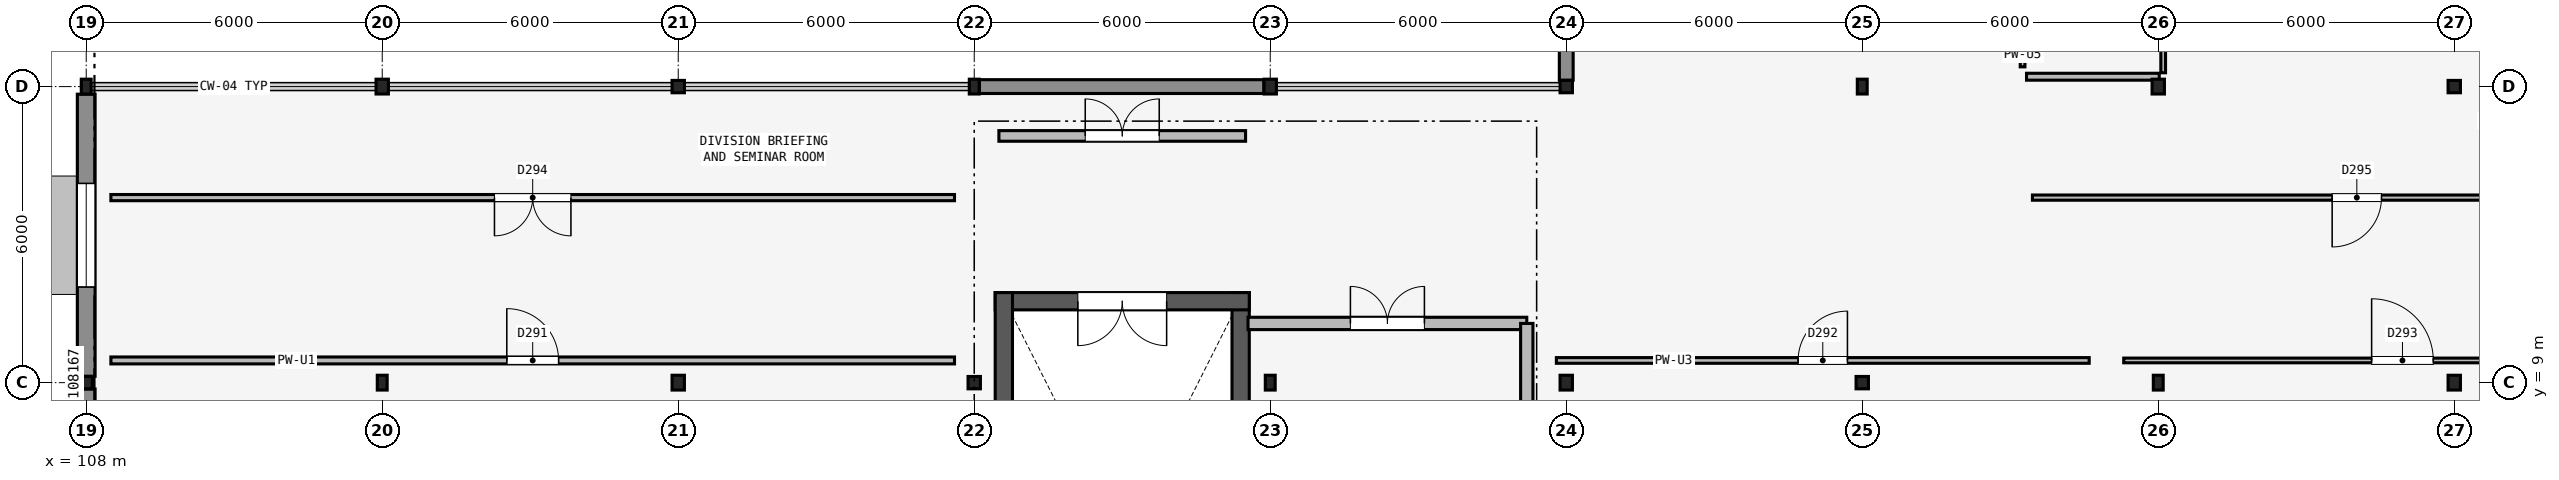
"""IFC4 building model, lengths in metres.
Left out: names, types, materials, properties, quantities, classifications, styles, units other than length and angle.
Written with IfcOpenShell. Run it as: python <this file> out.ifc"""

import sys

from ifc_helpers import new_model, si_unit, direction, frame, frame_2d, origin, origin_2d, place, context, subcontext, project, spatial, rectangle, hollow_rectangle, i_section, extrude, element, fill, save


model = new_model("IFC4")
c1 = context("Model", 3, precision=1e-05, world=origin(), true_north=direction((0.0, 1.0)))
c2 = subcontext(c1, "Body", "Model", "MODEL_VIEW")
j1 = project(units=[si_unit("LENGTHUNIT", "METRE"), si_unit("PLANEANGLEUNIT", "RADIAN")], contexts=[c1])
p1 = place(None, origin())
s1 = spatial("IfcSite", under=j1, at=p1, CompositionType="ELEMENT")
p2 = place(p1, origin())
s2 = spatial("IfcBuilding", under=s1, at=p2, CompositionType="ELEMENT")
p3 = place(p2, frame((0.0, 0.0, 26.1)))
s3 = spatial("IfcBuildingStorey", under=s2, at=p3, CompositionType="ELEMENT", Elevation=26.1)
p4 = place(p3, frame((108.0, 9.0, 0.0), z_axis=(0.0, 0.0, 1.0), x_axis=(1.0, 0.0, 0.0)))
e1 = element("IfcColumn", 1, at=p4, inside=s3, PredefinedType="COLUMN", context=c2, shape_type="SweptSolid", body=[
    extrude(hollow_rectangle(XDim=0.25, YDim=0.25, WallThickness=0.012, InnerFilletRadius=0.012, OuterFilletRadius=0.024, at=origin_2d()), origin(), (0.0, 0.0, 1.0), 3.9),
])
for number, where, z_axis, x_axis in (
    (2, (108.0, 15.0, 0.0), (0.0, 0.0, 1.0), (1.0, 0.0, 0.0)),
    (3, (114.0, 9.0, 0.0), (0.0, 0.0, 1.0), (1.0, 0.0, 0.0)),
):
    element("IfcColumn", number, at=place(p3, frame(where, z_axis=z_axis, x_axis=x_axis)), inside=s3, PredefinedType="COLUMN", context=c2, shape_type="SweptSolid", body=[
        extrude(hollow_rectangle(XDim=0.2, YDim=0.3, WallThickness=0.012, InnerFilletRadius=0.012, OuterFilletRadius=0.024, at=origin_2d()), origin(), (0.0, 0.0, 1.0), 3.9),
    ])
for number, where, z_axis, x_axis in (
    (4, (114.0, 15.0, 0.0), (0.0, 0.0, 1.0), (1.0, 0.0, 0.0)),
    (5, (120.0, 9.0, 0.0), (0.0, 0.0, 1.0), (1.0, 0.0, 0.0)),
):
    element("IfcColumn", number, at=place(p3, frame(where, z_axis=z_axis, x_axis=x_axis)), inside=s3, PredefinedType="COLUMN", context=c2, shape_type="SweptSolid", body=[
        extrude(i_section(OverallWidth=0.25, OverallDepth=0.3, WebThickness=0.01, FlangeThickness=0.01, FilletRadius=0.012, at=origin_2d()), origin(), (0.0, 0.0, 1.0), 3.9),
    ])
for number, where, z_axis, x_axis in (
    (6, (120.0, 15.0, 0.0), (0.0, 0.0, 1.0), (1.0, 0.0, 0.0)),
    (7, (126.0, 9.0, 0.0), (0.0, 0.0, 1.0), (1.0, 0.0, 0.0)),
):
    element("IfcColumn", number, at=place(p3, frame(where, z_axis=z_axis, x_axis=x_axis)), inside=s3, PredefinedType="COLUMN", context=c2, shape_type="SweptSolid", body=[
        extrude(hollow_rectangle(XDim=0.25, YDim=0.25, WallThickness=0.012, InnerFilletRadius=0.012, OuterFilletRadius=0.024, at=origin_2d()), origin(), (0.0, 0.0, 1.0), 3.9),
    ])
for number, where, z_axis, x_axis in (
    (8, (126.0, 15.0, 0.0), (0.0, 0.0, 1.0), (1.0, 0.0, 0.0)),
    (9, (132.0, 9.0, 0.0), (0.0, 0.0, 1.0), (1.0, 0.0, 0.0)),
):
    element("IfcColumn", number, at=place(p3, frame(where, z_axis=z_axis, x_axis=x_axis)), inside=s3, PredefinedType="COLUMN", context=c2, shape_type="SweptSolid", body=[
        extrude(hollow_rectangle(XDim=0.2, YDim=0.3, WallThickness=0.012, InnerFilletRadius=0.012, OuterFilletRadius=0.024, at=origin_2d()), origin(), (0.0, 0.0, 1.0), 3.9),
    ])
for number, where, z_axis, x_axis in (
    (10, (132.0, 15.0, 0.0), (0.0, 0.0, 1.0), (1.0, 0.0, 0.0)),
    (11, (138.0, 9.0, 0.0), (0.0, 0.0, 1.0), (1.0, 0.0, 0.0)),
):
    element("IfcColumn", number, at=place(p3, frame(where, z_axis=z_axis, x_axis=x_axis)), inside=s3, PredefinedType="COLUMN", context=c2, shape_type="SweptSolid", body=[
        extrude(i_section(OverallWidth=0.25, OverallDepth=0.3, WebThickness=0.01, FlangeThickness=0.01, FilletRadius=0.012, at=origin_2d()), origin(), (0.0, 0.0, 1.0), 3.9),
    ])
for number, where, z_axis, x_axis in (
    (12, (138.0, 15.0, 0.0), (0.0, 0.0, 1.0), (1.0, 0.0, 0.0)),
    (13, (144.0, 9.0, 0.0), (0.0, 0.0, 1.0), (1.0, 0.0, 0.0)),
):
    element("IfcColumn", number, at=place(p3, frame(where, z_axis=z_axis, x_axis=x_axis)), inside=s3, PredefinedType="COLUMN", context=c2, shape_type="SweptSolid", body=[
        extrude(hollow_rectangle(XDim=0.25, YDim=0.25, WallThickness=0.012, InnerFilletRadius=0.012, OuterFilletRadius=0.024, at=origin_2d()), origin(), (0.0, 0.0, 1.0), 3.9),
    ])
for number, where, z_axis, x_axis in (
    (14, (144.0, 15.0, 0.0), (0.0, 0.0, 1.0), (1.0, 0.0, 0.0)),
    (15, (150.0, 9.0, 0.0), (0.0, 0.0, 1.0), (1.0, 0.0, 0.0)),
):
    element("IfcColumn", number, at=place(p3, frame(where, z_axis=z_axis, x_axis=x_axis)), inside=s3, PredefinedType="COLUMN", context=c2, shape_type="SweptSolid", body=[
        extrude(hollow_rectangle(XDim=0.2, YDim=0.3, WallThickness=0.012, InnerFilletRadius=0.012, OuterFilletRadius=0.024, at=origin_2d()), origin(), (0.0, 0.0, 1.0), 3.9),
    ])
for number, where, z_axis, x_axis in (
    (16, (150.0, 15.0, 0.0), (0.0, 0.0, 1.0), (1.0, 0.0, 0.0)),
    (17, (156.0, 9.0, 0.0), (0.0, 0.0, 1.0), (1.0, 0.0, 0.0)),
):
    element("IfcColumn", number, at=place(p3, frame(where, z_axis=z_axis, x_axis=x_axis)), inside=s3, PredefinedType="COLUMN", context=c2, shape_type="SweptSolid", body=[
        extrude(i_section(OverallWidth=0.25, OverallDepth=0.3, WebThickness=0.01, FlangeThickness=0.01, FilletRadius=0.012, at=origin_2d()), origin(), (0.0, 0.0, 1.0), 3.9),
    ])
p5 = place(p3, frame((156.0, 15.0, 0.0), z_axis=(0.0, 0.0, 1.0), x_axis=(1.0, 0.0, 0.0)))
e18 = element("IfcColumn", 18, at=p5, inside=s3, PredefinedType="COLUMN", context=c2, shape_type="SweptSolid", body=[
    extrude(hollow_rectangle(XDim=0.25, YDim=0.25, WallThickness=0.012, InnerFilletRadius=0.012, OuterFilletRadius=0.024, at=origin_2d()), origin(), (0.0, 0.0, 1.0), 3.9),
])
p6 = place(p3, frame((126.104, 15.0, 0.0), z_axis=(0.0, 0.0, 1.0), x_axis=(1.0, 0.0, 0.0)))
e19 = element("IfcWall", 19, at=p6, inside=s3, PredefinedType="SOLIDWALL", context=c2, shape_type="SweptSolid", body=[
    extrude(rectangle(XDim=5.767, YDim=0.28, at=frame_2d((2.884, 0.0))), origin(), (0.0, 0.0, 1.0), 3.13),
])
p7 = place(p3, frame((138.0, 15.129, 0.0), z_axis=(0.0, 0.0, 1.0), x_axis=(0.0, 1.0, 0.0)))
e20 = element("IfcWall", 20, at=p7, inside=s3, PredefinedType="SOLIDWALL", context=c2, shape_type="SweptSolid", body=[
    extrude(rectangle(XDim=5.717, YDim=0.28, at=frame_2d((2.858, 0.0))), origin(), (0.0, 0.0, 1.0), 3.08),
])
p8 = place(p3, frame((108.0, 6.8, 0.0), z_axis=(0.0, 0.0, 1.0), x_axis=(0.0, 1.0, 0.0)))
e21 = element("IfcWall", 21, at=p8, inside=s3, PredefinedType="SOLIDWALL", context=c2, shape_type="SweptSolid", body=[
    extrude(rectangle(XDim=2.071, YDim=0.36, at=frame_2d((1.036, 0.0))), origin(), (0.0, 0.0, 1.0), 3.18),
])
p9 = place(p3, frame((108.0, 9.129, 0.0), z_axis=(0.0, 0.0, 1.0), x_axis=(0.0, 1.0, 0.0)))
e22 = element("IfcWall", 22, at=p9, inside=s3, PredefinedType="SOLIDWALL", context=c2, shape_type="SweptSolid", body=[
    extrude(rectangle(XDim=5.717, YDim=0.36, at=frame_2d((2.858, 0.0))), origin(), (0.0, 0.0, 1.0), 3.18),
])
p10 = place(p9, frame((1.809, 0.0, 0.9)))
e23 = element("IfcOpeningElement", 23, at=p10, cuts=e22, PredefinedType="OPENING", context=c2, shape_type="SweptSolid", body=[
    extrude(rectangle(XDim=2.1, YDim=1.5, at=frame_2d((1.05, 0.75))), frame((0.0, 0.19, 0.0), z_axis=(0.0, -1.0, 0.0), x_axis=(1.0, 0.0, 0.0)), (0.0, 0.0, 1.0), 0.38),
])
p11 = place(p3, frame((131.4, 1.075, 0.0), z_axis=(0.0, 0.0, 1.0), x_axis=(0.0, 1.0, 0.0)))
e24 = element("IfcWall", 24, at=p11, inside=s3, PredefinedType="SHEAR", context=c2, shape_type="SweptSolid", body=[
    extrude(rectangle(XDim=9.75, YDim=0.35, at=frame_2d((4.875, 0.0))), origin(), (0.0, 0.0, 1.0), 3.76),
])
p12 = place(p3, frame((131.575, 10.65, 0.0), z_axis=(0.0, 0.0, 1.0), x_axis=(-1.0, 0.0, 0.0)))
e25 = element("IfcWall", 25, at=p12, inside=s3, PredefinedType="SHEAR", context=c2, shape_type="SweptSolid", body=[
    extrude(rectangle(XDim=5.15, YDim=0.35, at=frame_2d((2.575, 0.0))), origin(), (0.0, 0.0, 1.0), 3.76),
])
p13 = place(p12, frame((1.675, 0.0, 0.0)))
e26 = element("IfcOpeningElement", 26, at=p13, cuts=e25, PredefinedType="OPENING", context=c2, shape_type="SweptSolid", body=[
    extrude(rectangle(XDim=1.8, YDim=2.2, at=frame_2d((0.9, 1.1))), frame((0.0, 0.185, 0.0), z_axis=(0.0, -1.0, 0.0), x_axis=(1.0, 0.0, 0.0)), (0.0, 0.0, 1.0), 0.37),
])
p14 = place(p3, frame((126.6, 10.825, 0.0), z_axis=(0.0, 0.0, 1.0), x_axis=(0.0, -1.0, 0.0)))
e27 = element("IfcWall", 27, at=p14, inside=s3, PredefinedType="SHEAR", context=c2, shape_type="SweptSolid", body=[
    extrude(rectangle(XDim=9.75, YDim=0.35, at=frame_2d((4.875, 0.0))), origin(), (0.0, 0.0, 1.0), 3.76),
])
p15 = place(p3, frame((126.5, 14.0, 0.0), z_axis=(0.0, 0.0, 1.0), x_axis=(1.0, 0.0, 0.0)))
e28 = element("IfcWall", 28, at=p15, inside=s3, PredefinedType="PARTITIONING", context=c2, shape_type="SweptSolid", body=[
    extrude(rectangle(XDim=5.0, YDim=0.215, at=frame_2d((2.5, 0.0))), origin(), (0.0, 0.0, 1.0), 3.68),
])
p16 = place(p15, frame((1.75, 0.0, 0.0)))
e29 = element("IfcOpeningElement", 29, at=p16, cuts=e28, PredefinedType="OPENING", context=c2, shape_type="SweptSolid", body=[
    extrude(rectangle(XDim=1.5, YDim=2.15, at=frame_2d((0.75, 1.075))), frame((0.0, 0.117, 0.0), z_axis=(0.0, -1.0, 0.0), x_axis=(1.0, 0.0, 0.0)), (0.0, 0.0, 1.0), 0.235),
])
p17 = place(p3, frame((131.55, 10.2, 0.0), z_axis=(0.0, 0.0, 1.0), x_axis=(1.0, 0.0, 0.0)))
e30 = element("IfcWall", 30, at=p17, inside=s3, PredefinedType="PARTITIONING", context=c2, shape_type="SweptSolid", body=[
    extrude(rectangle(XDim=5.65, YDim=0.25, at=frame_2d((2.825, 0.0))), origin(), (0.0, 0.0, 1.0), 3.273),
])
p18 = place(p17, frame((2.075, 0.0, 0.0)))
e31 = element("IfcOpeningElement", 31, at=p18, cuts=e30, PredefinedType="OPENING", context=c2, shape_type="SweptSolid", body=[
    extrude(rectangle(XDim=1.5, YDim=2.15, at=frame_2d((0.75, 1.075))), frame((0.0, 0.135, 0.0), z_axis=(0.0, -1.0, 0.0), x_axis=(1.0, 0.0, 0.0)), (0.0, 0.0, 1.0), 0.27),
])
p19 = place(p3, frame((137.2, 5.8, 0.0), z_axis=(0.0, 0.0, 1.0), x_axis=(0.0, 1.0, 0.0)))
e32 = element("IfcWall", 32, at=p19, inside=s3, PredefinedType="PARTITIONING", context=c2, shape_type="SweptSolid", body=[
    extrude(rectangle(XDim=4.4, YDim=0.25, at=frame_2d((2.2, 0.0))), origin(), (0.0, 0.0, 1.0), 3.28),
])
p20 = place(p3, frame((147.25, 15.4, 0.0), z_axis=(0.0, 0.0, 1.0), x_axis=(0.0, 1.0, 0.0)))
e33 = element("IfcWall", 33, at=p20, inside=s3, PredefinedType="PARTITIONING", context=c2, shape_type="SweptSolid", body=[
    extrude(rectangle(XDim=2.5, YDim=0.095, at=frame_2d((1.25, 0.0))), origin(), (0.0, 0.0, 1.0), 3.68),
])
p21 = place(p20, frame((0.75, 0.0, 0.0)))
e34 = element("IfcOpeningElement", 34, at=p21, cuts=e33, PredefinedType="OPENING", context=c2, shape_type="SweptSolid", body=[
    extrude(rectangle(XDim=1.0, YDim=2.1, at=frame_2d((0.5, 1.05))), frame((0.0, 0.057, 0.0), z_axis=(0.0, -1.0, 0.0), x_axis=(1.0, 0.0, 0.0)), (0.0, 0.0, 1.0), 0.115),
])
p22 = place(p3, frame((108.5, 9.45, 0.0), z_axis=(0.0, 0.0, 1.0), x_axis=(1.0, 0.0, 0.0)))
e35 = element("IfcWall", 35, at=p22, inside=s3, PredefinedType="PARTITIONING", context=c2, shape_type="SweptSolid", body=[
    extrude(rectangle(XDim=17.1, YDim=0.14, at=frame_2d((8.55, 0.0))), origin(), (0.0, 0.0, 1.0), 3.273),
])
p23 = place(p22, frame((8.025, 0.0, 0.0)))
e36 = element("IfcOpeningElement", 36, at=p23, cuts=e35, PredefinedType="OPENING", context=c2, shape_type="SweptSolid", body=[
    extrude(rectangle(XDim=1.05, YDim=2.2, at=frame_2d((0.525, 1.1))), frame((0.0, 0.08, 0.0), z_axis=(0.0, -1.0, 0.0), x_axis=(1.0, 0.0, 0.0)), (0.0, 0.0, 1.0), 0.16),
])
p24 = place(p3, frame((137.8, 9.45, 0.0), z_axis=(0.0, 0.0, 1.0), x_axis=(1.0, 0.0, 0.0)))
e37 = element("IfcWall", 37, at=p24, inside=s3, PredefinedType="PARTITIONING", context=c2, shape_type="SweptSolid", body=[
    extrude(rectangle(XDim=10.8, YDim=0.115, at=frame_2d((5.4, 0.0))), origin(), (0.0, 0.0, 1.0), 3.273),
])
p25 = place(p24, frame((4.9, 0.0, 0.0)))
e38 = element("IfcOpeningElement", 38, at=p25, cuts=e37, PredefinedType="OPENING", context=c2, shape_type="SweptSolid", body=[
    extrude(rectangle(XDim=1.0, YDim=2.15, at=frame_2d((0.5, 1.075))), frame((0.0, 0.067, 0.0), z_axis=(0.0, -1.0, 0.0), x_axis=(1.0, 0.0, 0.0)), (0.0, 0.0, 1.0), 0.135),
])
p26 = place(p3, frame((149.3, 9.45, 0.0), z_axis=(0.0, 0.0, 1.0), x_axis=(1.0, 0.0, 0.0)))
e39 = element("IfcWall", 39, at=p26, inside=s3, PredefinedType="PARTITIONING", context=c2, shape_type="SweptSolid", body=[
    extrude(rectangle(XDim=11.3, YDim=0.095, at=frame_2d((5.65, 0.0))), origin(), (0.0, 0.0, 1.0), 3.273),
])
p27 = place(p26, frame((5.025, 0.0, 0.0)))
e40 = element("IfcOpeningElement", 40, at=p27, cuts=e39, PredefinedType="OPENING", context=c2, shape_type="SweptSolid", body=[
    extrude(rectangle(XDim=1.25, YDim=2.15, at=frame_2d((0.625, 1.075))), frame((0.0, 0.057, 0.0), z_axis=(0.0, -1.0, 0.0), x_axis=(1.0, 0.0, 0.0)), (0.0, 0.0, 1.0), 0.115),
])
p28 = place(p3, frame((125.6, 12.75, 0.0), z_axis=(0.0, 0.0, 1.0), x_axis=(-1.0, 0.0, 0.0)))
e41 = element("IfcWall", 41, at=p28, inside=s3, PredefinedType="PARTITIONING", context=c2, shape_type="SweptSolid", body=[
    extrude(rectangle(XDim=17.1, YDim=0.125, at=frame_2d((8.55, 0.0))), origin(), (0.0, 0.0, 1.0), 3.273),
])
p29 = place(p28, frame((7.775, 0.0, 0.0)))
e42 = element("IfcOpeningElement", 42, at=p29, cuts=e41, PredefinedType="OPENING", context=c2, shape_type="SweptSolid", body=[
    extrude(rectangle(XDim=1.55, YDim=2.2, at=frame_2d((0.775, 1.1))), frame((0.0, 0.073, 0.0), z_axis=(0.0, -1.0, 0.0), x_axis=(1.0, 0.0, 0.0)), (0.0, 0.0, 1.0), 0.145),
])
p30 = place(p3, frame((160.6, 12.75, 0.0), z_axis=(0.0, 0.0, 1.0), x_axis=(-1.0, 0.0, 0.0)))
e43 = element("IfcWall", 43, at=p30, inside=s3, PredefinedType="PARTITIONING", context=c2, shape_type="SweptSolid", body=[
    extrude(rectangle(XDim=13.15, YDim=0.105, at=frame_2d((6.575, 0.0))), origin(), (0.0, 0.0, 1.0), 3.273),
])
p31 = place(p30, frame((6.075, 0.0, 0.0)))
e44 = element("IfcOpeningElement", 44, at=p31, cuts=e43, PredefinedType="OPENING", context=c2, shape_type="SweptSolid", body=[
    extrude(rectangle(XDim=1.0, YDim=2.15, at=frame_2d((0.5, 1.075))), frame((0.0, 0.062, 0.0), z_axis=(0.0, -1.0, 0.0), x_axis=(1.0, 0.0, 0.0)), (0.0, 0.0, 1.0), 0.125),
])
p32 = place(p3, frame((150.1, 18.02, 0.0), z_axis=(0.0, 0.0, 1.0), x_axis=(0.0, -1.0, 0.0)))
e45 = element("IfcWall", 45, at=p32, inside=s3, PredefinedType="PARTITIONING", context=c2, shape_type="SweptSolid", body=[
    extrude(rectangle(XDim=2.74, YDim=0.095, at=frame_2d((1.37, 0.0))), origin(), (0.0, 0.0, 1.0), 3.273),
])
p33 = place(p3, frame((150.02, 15.2, 0.0), z_axis=(0.0, 0.0, 1.0), x_axis=(-1.0, 0.0, 0.0)))
e46 = element("IfcWall", 46, at=p33, inside=s3, PredefinedType="PARTITIONING", context=c2, shape_type="SweptSolid", body=[
    extrude(rectangle(XDim=2.69, YDim=0.14, at=frame_2d((1.345, 0.0))), origin(), (0.0, 0.0, 1.0), 3.08),
])
p34 = place(p10, origin())
e47 = element("IfcWindow", 47, at=p34, inside=s3, PartitioningType="SINGLE_PANEL", PredefinedType="WINDOW", context=c2, shape_type="SweptSolid", body=[
    extrude(rectangle(XDim=2.1, YDim=1.5, at=frame_2d((1.05, 0.75))), frame((0.0, 0.03, 0.0), z_axis=(0.0, -1.0, 0.0), x_axis=(1.0, 0.0, 0.0)), (0.0, 0.0, 1.0), 0.06),
])
fill(e23, e47)
p35 = place(p13, origin())
e48 = element("IfcDoor", 48, at=p35, inside=s3, OperationType="DOUBLE_DOOR_SINGLE_SWING", PredefinedType="DOOR", context=c2, shape_type="SweptSolid", body=[
    extrude(rectangle(XDim=1.8, YDim=2.2, at=frame_2d((0.9, 1.1))), frame((0.0, 0.025, 0.0), z_axis=(0.0, -1.0, 0.0), x_axis=(1.0, 0.0, 0.0)), (0.0, 0.0, 1.0), 0.05),
])
fill(e26, e48)
p36 = place(p16, origin())
e49 = element("IfcDoor", 49, at=p36, inside=s3, OperationType="DOUBLE_DOOR_SINGLE_SWING", PredefinedType="DOOR", context=c2, shape_type="SweptSolid", body=[
    extrude(rectangle(XDim=1.5, YDim=2.15, at=frame_2d((0.75, 1.075))), frame((0.0, 0.025, 0.0), z_axis=(0.0, -1.0, 0.0), x_axis=(1.0, 0.0, 0.0)), (0.0, 0.0, 1.0), 0.05),
])
fill(e29, e49)
p37 = place(p18, origin())
e50 = element("IfcDoor", 50, at=p37, inside=s3, OperationType="DOUBLE_DOOR_SINGLE_SWING", PredefinedType="DOOR", context=c2, shape_type="SweptSolid", body=[
    extrude(rectangle(XDim=1.5, YDim=2.15, at=frame_2d((0.75, 1.075))), frame((0.0, 0.025, 0.0), z_axis=(0.0, -1.0, 0.0), x_axis=(1.0, 0.0, 0.0)), (0.0, 0.0, 1.0), 0.05),
])
fill(e31, e50)
p38 = place(p23, origin())
e51 = element("IfcDoor", 51, at=p38, inside=s3, OperationType="SINGLE_SWING_LEFT", PredefinedType="DOOR", context=c2, shape_type="SweptSolid", body=[
    extrude(rectangle(XDim=1.05, YDim=2.2, at=frame_2d((0.525, 1.1))), frame((0.0, 0.025, 0.0), z_axis=(0.0, -1.0, 0.0), x_axis=(1.0, 0.0, 0.0)), (0.0, 0.0, 1.0), 0.05),
])
fill(e36, e51)
p39 = place(p25, origin())
e52 = element("IfcDoor", 52, at=p39, inside=s3, OperationType="SINGLE_SWING_RIGHT", PredefinedType="DOOR", context=c2, shape_type="SweptSolid", body=[
    extrude(rectangle(XDim=1.0, YDim=2.15, at=frame_2d((0.5, 1.075))), frame((0.0, 0.025, 0.0), z_axis=(0.0, -1.0, 0.0), x_axis=(1.0, 0.0, 0.0)), (0.0, 0.0, 1.0), 0.05),
])
fill(e38, e52)
p40 = place(p27, origin())
e53 = element("IfcDoor", 53, at=p40, inside=s3, OperationType="SINGLE_SWING_LEFT", PredefinedType="DOOR", context=c2, shape_type="SweptSolid", body=[
    extrude(rectangle(XDim=1.25, YDim=2.15, at=frame_2d((0.625, 1.075))), frame((0.0, 0.025, 0.0), z_axis=(0.0, -1.0, 0.0), x_axis=(1.0, 0.0, 0.0)), (0.0, 0.0, 1.0), 0.05),
])
fill(e40, e53)
p41 = place(p29, origin())
e54 = element("IfcDoor", 54, at=p41, inside=s3, OperationType="DOUBLE_DOOR_SINGLE_SWING", PredefinedType="DOOR", context=c2, shape_type="SweptSolid", body=[
    extrude(rectangle(XDim=1.55, YDim=2.2, at=frame_2d((0.775, 1.1))), frame((0.0, 0.025, 0.0), z_axis=(0.0, -1.0, 0.0), x_axis=(1.0, 0.0, 0.0)), (0.0, 0.0, 1.0), 0.05),
])
fill(e42, e54)
p42 = place(p31, origin())
e55 = element("IfcDoor", 55, at=p42, inside=s3, OperationType="SINGLE_SWING_RIGHT", PredefinedType="DOOR", context=c2, shape_type="SweptSolid", body=[
    extrude(rectangle(XDim=1.0, YDim=2.15, at=frame_2d((0.5, 1.075))), frame((0.0, 0.025, 0.0), z_axis=(0.0, -1.0, 0.0), x_axis=(1.0, 0.0, 0.0)), (0.0, 0.0, 1.0), 0.05),
])
fill(e44, e55)
save(model, sys.argv[1])
